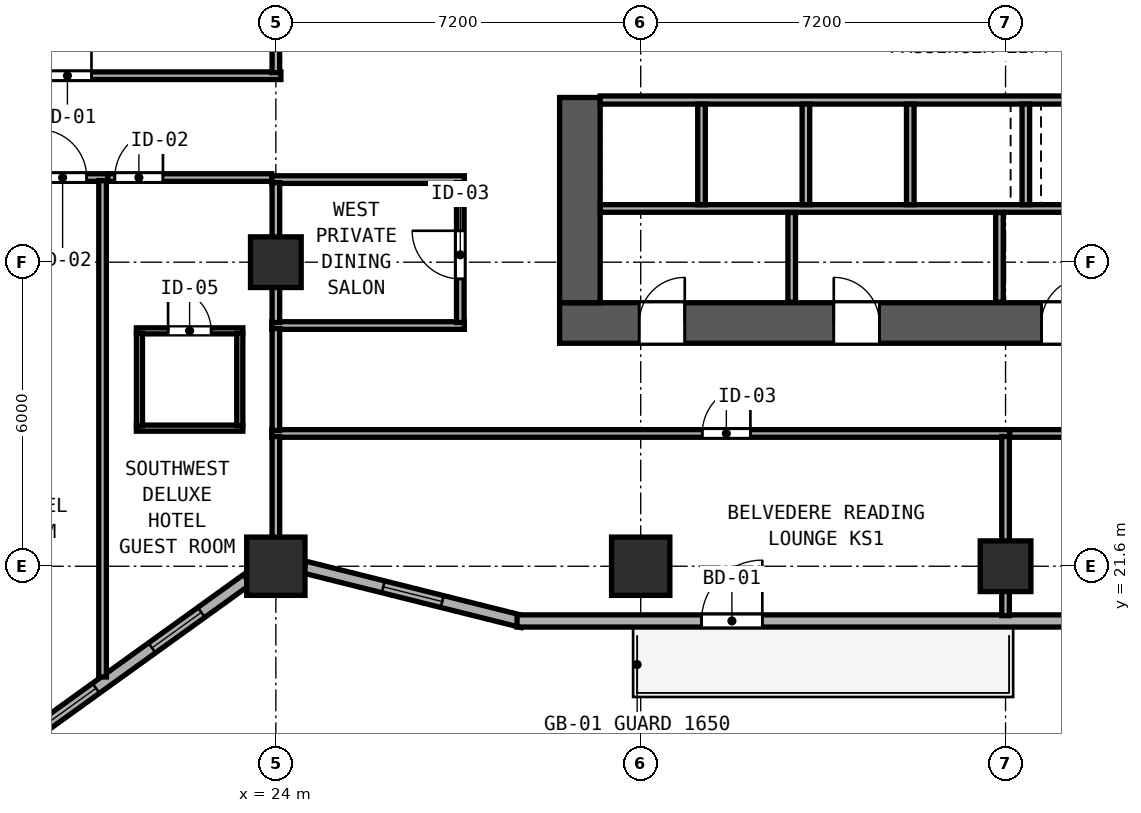
"""IFC4 building model, lengths in metres.
Left out: names, types, materials, properties, quantities, classifications, styles, units other than length and angle.
Written with IfcOpenShell. Run it as: python <this file> out.ifc"""

import sys

from ifc_helpers import new_model, si_unit, direction, frame, frame_2d, origin, origin_2d, place, context, subcontext, project, spatial, rectangle, hollow_rectangle, extrude, element, fill, save


model = new_model("IFC4")
c1 = context("Model", 3, precision=1e-05, world=origin(), true_north=direction((0.0, 1.0)))
c2 = subcontext(c1, "Body", "Model", "MODEL_VIEW")
j1 = project(units=[si_unit("LENGTHUNIT", "METRE"), si_unit("PLANEANGLEUNIT", "RADIAN")], contexts=[c1])
p1 = place(None, origin())
s1 = spatial("IfcSite", under=j1, at=p1, CompositionType="ELEMENT")
p2 = place(p1, origin())
s2 = spatial("IfcBuilding", under=s1, at=p2, CompositionType="ELEMENT")
p3 = place(p2, frame((0.0, 0.0, 55.2)))
s3 = spatial("IfcBuildingStorey", under=s2, at=p3, CompositionType="ELEMENT", Elevation=55.2)
p4 = place(p3, frame((29.6, 26.4, 0.0), z_axis=(0.0, 0.0, 1.0), x_axis=(1.0, 0.0, 0.0)))
e1 = element("IfcWall", 1, at=p4, inside=s3, PredefinedType="SHEAR", context=c2, shape_type="SweptSolid", body=[
    extrude(rectangle(XDim=17.6, YDim=0.8, at=frame_2d((8.8, 0.0))), origin(), (0.0, 0.0, 1.0), 3.6),
])
p5 = place(p4, frame((2.47, 0.0, 0.0), z_axis=(0.0, 0.0, 1.0), x_axis=(-1.0, 0.0, 0.0)))
e2 = element("IfcOpeningElement", 2, at=p5, cuts=e1, PredefinedType="OPENING", context=c2, shape_type="SweptSolid", body=[
    extrude(rectangle(XDim=0.9, YDim=2.1, at=frame_2d((0.45, 1.05))), frame((0.0, 0.41, 0.0), z_axis=(0.0, -1.0, 0.0), x_axis=(1.0, 0.0, 0.0)), (0.0, 0.0, 1.0), 0.82),
])
p6 = place(p4, frame((6.31, 0.0, 0.0), z_axis=(0.0, 0.0, 1.0), x_axis=(-1.0, 0.0, 0.0)))
e3 = element("IfcOpeningElement", 3, at=p6, cuts=e1, PredefinedType="OPENING", context=c2, shape_type="SweptSolid", body=[
    extrude(rectangle(XDim=0.9, YDim=2.1, at=frame_2d((0.45, 1.05))), frame((0.0, 0.41, 0.0), z_axis=(0.0, -1.0, 0.0), x_axis=(1.0, 0.0, 0.0)), (0.0, 0.0, 1.0), 0.82),
])
p7 = place(p4, frame((10.41, 0.0, 0.0), z_axis=(0.0, 0.0, 1.0), x_axis=(-1.0, 0.0, 0.0)))
e4 = element("IfcOpeningElement", 4, at=p7, cuts=e1, PredefinedType="OPENING", context=c2, shape_type="SweptSolid", body=[
    extrude(rectangle(XDim=0.9, YDim=2.1, at=frame_2d((0.45, 1.05))), frame((0.0, 0.41, 0.0), z_axis=(0.0, -1.0, 0.0), x_axis=(1.0, 0.0, 0.0)), (0.0, 0.0, 1.0), 0.82),
])
p8 = place(p4, frame((14.51, 0.0, 0.0), z_axis=(0.0, 0.0, 1.0), x_axis=(-1.0, 0.0, 0.0)))
e5 = element("IfcOpeningElement", 5, at=p8, cuts=e1, PredefinedType="OPENING", context=c2, shape_type="SweptSolid", body=[
    extrude(rectangle(XDim=0.9, YDim=2.1, at=frame_2d((0.45, 1.05))), frame((0.0, 0.41, 0.0), z_axis=(0.0, -1.0, 0.0), x_axis=(1.0, 0.0, 0.0)), (0.0, 0.0, 1.0), 0.82),
])
p9 = place(p3, frame((30.0, 26.8, 0.0), z_axis=(0.0, 0.0, 1.0), x_axis=(0.0, 1.0, 0.0)))
e6 = element("IfcWall", 6, at=p9, inside=s3, PredefinedType="SHEAR", context=c2, shape_type="SweptSolid", body=[
    extrude(rectangle(XDim=4.05, YDim=0.8, at=frame_2d((2.025, 0.0))), origin(), (0.0, 0.0, 1.0), 3.6),
])
for number, where, z_axis, x_axis in (
    (7, (24.0, 21.6, 0.0), (0.0, 0.0, 1.0), (1.0, 0.0, 0.0)),
    (8, (31.2, 21.6, 0.0), (0.0, 0.0, 1.0), (1.0, 0.0, 0.0)),
):
    element("IfcColumn", number, at=place(p3, frame(where, z_axis=z_axis, x_axis=x_axis)), inside=s3, PredefinedType="COLUMN", context=c2, shape_type="SweptSolid", body=[
        extrude(hollow_rectangle(XDim=1.15, YDim=1.15, WallThickness=0.042, at=origin_2d()), origin(), (0.0, 0.0, 1.0), 3.8),
    ])
for number, where, z_axis, x_axis in (
    (9, (24.0, 27.6, 0.0), (0.0, 0.0, 1.0), (1.0, 0.0, 0.0)),
    (10, (38.4, 21.6, 0.0), (0.0, 0.0, 1.0), (1.0, 0.0, 0.0)),
):
    element("IfcColumn", number, at=place(p3, frame(where, z_axis=z_axis, x_axis=x_axis)), inside=s3, PredefinedType="COLUMN", context=c2, shape_type="SweptSolid", body=[
        extrude(hollow_rectangle(XDim=1.0, YDim=1.0, WallThickness=0.038, at=origin_2d()), origin(), (0.0, 0.0, 1.0), 3.8),
    ])
p10 = place(p3, frame((14.075, 14.602, 0.0), z_axis=(0.0, 0.0, 1.0), x_axis=(0.811543176492, 0.58429245476, 0.0)))
e11 = element("IfcWall", 11, at=p10, inside=s3, PredefinedType="SOLIDWALL", context=c2, shape_type="SweptSolid", body=[
    extrude(rectangle(XDim=11.531, YDim=0.24, at=frame_2d((5.765, 0.0))), origin(), (0.0, 0.0, 1.0), 3.097),
])
p11 = place(p10, frame((1.554, 0.0, 0.85)))
e12 = element("IfcOpeningElement", 12, at=p11, cuts=e11, PredefinedType="OPENING", context=c2, shape_type="SweptSolid", body=[
    extrude(rectangle(XDim=1.2, YDim=1.85, at=frame_2d((0.6, 0.925))), frame((0.0, 0.13, 0.0), z_axis=(0.0, -1.0, 0.0), x_axis=(1.0, 0.0, 0.0)), (0.0, 0.0, 1.0), 0.26),
])
p12 = place(p10, frame((6.656, 0.0, 0.85)))
e13 = element("IfcOpeningElement", 13, at=p12, cuts=e11, PredefinedType="OPENING", context=c2, shape_type="SweptSolid", body=[
    extrude(rectangle(XDim=1.2, YDim=1.85, at=frame_2d((0.6, 0.925))), frame((0.0, 0.13, 0.0), z_axis=(0.0, -1.0, 0.0), x_axis=(1.0, 0.0, 0.0)), (0.0, 0.0, 1.0), 0.26),
])
p13 = place(p10, frame((9.218, 0.0, 0.85)))
e14 = element("IfcOpeningElement", 14, at=p13, cuts=e11, PredefinedType="OPENING", context=c2, shape_type="SweptSolid", body=[
    extrude(rectangle(XDim=1.2, YDim=1.85, at=frame_2d((0.6, 0.925))), frame((0.0, 0.13, 0.0), z_axis=(0.0, -1.0, 0.0), x_axis=(1.0, 0.0, 0.0)), (0.0, 0.0, 1.0), 0.26),
])
p14 = place(p3, frame((24.567, 21.582, 0.0), z_axis=(0.0, 0.0, 1.0), x_axis=(0.970148978127, -0.24250971164, 0.0)))
e15 = element("IfcWall", 15, at=p14, inside=s3, PredefinedType="SOLIDWALL", context=c2, shape_type="SweptSolid", body=[
    extrude(rectangle(XDim=4.434, YDim=0.24, at=frame_2d((2.217, 0.0))), origin(), (0.0, 0.0, 1.0), 3.097),
])
p15 = place(p14, frame((1.6, 0.0, 0.85)))
e16 = element("IfcOpeningElement", 16, at=p15, cuts=e15, PredefinedType="OPENING", context=c2, shape_type="SweptSolid", body=[
    extrude(rectangle(XDim=1.2, YDim=1.85, at=frame_2d((0.6, 0.925))), frame((0.0, 0.13, 0.0), z_axis=(0.0, -1.0, 0.0), x_axis=(1.0, 0.0, 0.0)), (0.0, 0.0, 1.0), 0.26),
])
p16 = place(p3, frame((28.76, 20.52, 0.0), z_axis=(0.0, 0.0, 1.0), x_axis=(1.0, 0.0, 0.0)))
e17 = element("IfcWall", 17, at=p16, inside=s3, PredefinedType="SOLIDWALL", context=c2, shape_type="SweptSolid", body=[
    extrude(rectangle(XDim=19.281, YDim=0.24, at=frame_2d((9.64, 0.0))), origin(), (0.0, 0.0, 1.0), 3.6),
])
p17 = place(p16, frame((4.84, 0.0, 0.0), z_axis=(0.0, 0.0, 1.0), x_axis=(-1.0, 0.0, 0.0)))
e18 = element("IfcOpeningElement", 18, at=p17, cuts=e17, PredefinedType="OPENING", context=c2, shape_type="SweptSolid", body=[
    extrude(rectangle(XDim=1.2, YDim=2.15, at=frame_2d((0.6, 1.075))), frame((0.0, 0.13, 0.0), z_axis=(0.0, -1.0, 0.0), x_axis=(1.0, 0.0, 0.0)), (0.0, 0.0, 1.0), 0.26),
])
p18 = place(p3, frame((30.4, 30.8, 0.0), z_axis=(0.0, 0.0, 1.0), x_axis=(1.0, 0.0, 0.0)))
e19 = element("IfcWall", 19, at=p18, inside=s3, PredefinedType="SOLIDWALL", context=c2, shape_type="SweptSolid", body=[
    extrude(rectangle(XDim=16.0, YDim=0.16, at=frame_2d((8.0, 0.0))), origin(), (0.0, 0.0, 1.0), 3.6),
])
p19 = place(p3, frame((30.4, 28.66, 0.0), z_axis=(0.0, 0.0, 1.0), x_axis=(1.0, 0.0, 0.0)))
e20 = element("IfcWall", 20, at=p19, inside=s3, PredefinedType="PARTITIONING", context=c2, shape_type="SweptSolid", body=[
    extrude(rectangle(XDim=16.0, YDim=0.15, at=frame_2d((8.0, 0.0))), origin(), (0.0, 0.0, 1.0), 3.6),
])
for number, where, z_axis, x_axis in (
    (21, (32.4, 28.735, 0.0), (0.0, 0.0, 1.0), (0.0, 1.0, 0.0)),
    (22, (34.46, 28.735, 0.0), (0.0, 0.0, 1.0), (0.0, 1.0, 0.0)),
    (23, (36.52, 28.735, 0.0), (0.0, 0.0, 1.0), (0.0, 1.0, 0.0)),
    (24, (38.8, 28.735, 0.0), (0.0, 0.0, 1.0), (0.0, 1.0, 0.0)),
):
    element("IfcWall", number, at=place(p3, frame(where, z_axis=z_axis, x_axis=x_axis)), inside=s3, PredefinedType="SOLIDWALL", context=c2, shape_type="SweptSolid", body=[
        extrude(rectangle(XDim=1.985, YDim=0.15, at=frame_2d((0.992, 0.0))), origin(), (0.0, 0.0, 1.0), 3.6),
    ])
for number, where, z_axis, x_axis in (
    (25, (34.18, 26.81, 0.0), (0.0, 0.0, 1.0), (0.0, 1.0, 0.0)),
    (26, (38.28, 26.81, 0.0), (0.0, 0.0, 1.0), (0.0, 1.0, 0.0)),
):
    element("IfcWall", number, at=place(p3, frame(where, z_axis=z_axis, x_axis=x_axis)), inside=s3, PredefinedType="PARTITIONING", context=c2, shape_type="SweptSolid", body=[
        extrude(rectangle(XDim=1.77, YDim=0.15, at=frame_2d((0.885, 0.0))), origin(), (0.0, 0.0, 1.0), 3.6),
    ])
for number, where, z_axis, x_axis in (
    (27, (23.92, 29.23, 0.0), (0.0, 0.0, 1.0), (1.0, 0.0, 0.0)),
    (28, (23.92, 26.35, 0.0), (0.0, 0.0, 1.0), (1.0, 0.0, 0.0)),
):
    element("IfcWall", number, at=place(p3, frame(where, z_axis=z_axis, x_axis=x_axis)), inside=s3, PredefinedType="PARTITIONING", context=c2, shape_type="SweptSolid", body=[
        extrude(rectangle(XDim=3.8, YDim=0.15, at=frame_2d((1.9, 0.0))), origin(), (0.0, 0.0, 1.0), 3.6),
    ])
p20 = place(p3, frame((24.0, 26.41, 0.0), z_axis=(0.0, 0.0, 1.0), x_axis=(0.0, 1.0, 0.0)))
e29 = element("IfcWall", 29, at=p20, inside=s3, PredefinedType="PARTITIONING", context=c2, shape_type="SweptSolid", body=[
    extrude(rectangle(XDim=2.76, YDim=0.15, at=frame_2d((1.38, 0.0))), origin(), (0.0, 0.0, 1.0), 3.097),
])
p21 = place(p3, frame((27.64, 26.41, 0.0), z_axis=(0.0, 0.0, 1.0), x_axis=(0.0, 1.0, 0.0)))
e30 = element("IfcWall", 30, at=p21, inside=s3, PredefinedType="PARTITIONING", context=c2, shape_type="SweptSolid", body=[
    extrude(rectangle(XDim=2.76, YDim=0.15, at=frame_2d((1.38, 0.0))), origin(), (0.0, 0.0, 1.0), 3.6),
])
p22 = place(p21, frame((1.81, 0.0, 0.0), z_axis=(0.0, 0.0, 1.0), x_axis=(-1.0, 0.0, 0.0)))
e31 = element("IfcOpeningElement", 31, at=p22, cuts=e30, PredefinedType="OPENING", context=c2, shape_type="SweptSolid", body=[
    extrude(rectangle(XDim=0.95, YDim=2.12, at=frame_2d((0.475, 1.06))), frame((0.0, 0.085, 0.0), z_axis=(0.0, -1.0, 0.0), x_axis=(1.0, 0.0, 0.0)), (0.0, 0.0, 1.0), 0.17),
])
p23 = place(p3, frame((23.92, 24.22, 0.0), z_axis=(0.0, 0.0, 1.0), x_axis=(1.0, 0.0, 0.0)))
e32 = element("IfcWall", 32, at=p23, inside=s3, PredefinedType="PARTITIONING", context=c2, shape_type="SweptSolid", body=[
    extrude(rectangle(XDim=14.56, YDim=0.15, at=frame_2d((7.28, 0.0))), origin(), (0.0, 0.0, 1.0), 3.6),
])
p24 = place(p23, frame((9.445, 0.0, 0.0), z_axis=(0.0, 0.0, 1.0), x_axis=(-1.0, 0.0, 0.0)))
e33 = element("IfcOpeningElement", 33, at=p24, cuts=e32, PredefinedType="OPENING", context=c2, shape_type="SweptSolid", body=[
    extrude(rectangle(XDim=0.95, YDim=2.12, at=frame_2d((0.475, 1.06))), frame((0.0, 0.085, 0.0), z_axis=(0.0, -1.0, 0.0), x_axis=(1.0, 0.0, 0.0)), (0.0, 0.0, 1.0), 0.17),
])
p25 = place(p3, frame((24.0, 21.819, 0.0), z_axis=(0.0, 0.0, 1.0), x_axis=(0.0, 1.0, 0.0)))
e34 = element("IfcWall", 34, at=p25, inside=s3, PredefinedType="PARTITIONING", context=c2, shape_type="SweptSolid", body=[
    extrude(rectangle(XDim=2.341, YDim=0.15, at=frame_2d((1.171, 0.0))), origin(), (0.0, 0.0, 1.0), 3.097),
])
p26 = place(p3, frame((38.4, 20.625, 0.0), z_axis=(0.0, 0.0, 1.0), x_axis=(0.0, 1.0, 0.0)))
e35 = element("IfcWall", 35, at=p26, inside=s3, PredefinedType="PARTITIONING", context=c2, shape_type="SweptSolid", body=[
    extrude(rectangle(XDim=3.535, YDim=0.15, at=frame_2d((1.768, 0.0))), origin(), (0.0, 0.0, 1.0), 2.985),
])
p27 = place(p3, frame((38.482, 24.22, 0.0), z_axis=(0.0, 0.0, 1.0), x_axis=(1.0, 0.0, 0.0)))
e36 = element("IfcWall", 36, at=p27, inside=s3, PredefinedType="PARTITIONING", context=c2, shape_type="SweptSolid", body=[
    extrude(rectangle(XDim=7.198, YDim=0.15, at=frame_2d((3.599, 0.0))), origin(), (0.0, 0.0, 1.0), 3.6),
])
p28 = place(p27, frame((3.913, 0.0, 0.0), z_axis=(0.0, 0.0, 1.0), x_axis=(-1.0, 0.0, 0.0)))
e37 = element("IfcOpeningElement", 37, at=p28, cuts=e36, PredefinedType="OPENING", context=c2, shape_type="SweptSolid", body=[
    extrude(rectangle(XDim=0.95, YDim=2.12, at=frame_2d((0.475, 1.06))), frame((0.0, 0.085, 0.0), z_axis=(0.0, -1.0, 0.0), x_axis=(1.0, 0.0, 0.0)), (0.0, 0.0, 1.0), 0.17),
])
p29 = place(p3, frame((16.542, 31.28, 0.0), z_axis=(0.0, 0.0, 1.0), x_axis=(1.0, 0.0, 0.0)))
e38 = element("IfcWall", 38, at=p29, inside=s3, PredefinedType="PARTITIONING", context=c2, shape_type="SweptSolid", body=[
    extrude(rectangle(XDim=7.558, YDim=0.15, at=frame_2d((3.779, 0.0))), origin(), (0.0, 0.0, 1.0), 3.6),
])
p30 = place(p29, frame((2.869, 0.0, 0.0)))
e39 = element("IfcOpeningElement", 39, at=p30, cuts=e38, PredefinedType="OPENING", context=c2, shape_type="SweptSolid", body=[
    extrude(rectangle(XDim=0.95, YDim=2.18, at=frame_2d((0.475, 1.09))), frame((0.0, 0.085, 0.0), z_axis=(0.0, -1.0, 0.0), x_axis=(1.0, 0.0, 0.0)), (0.0, 0.0, 1.0), 0.17),
])
p31 = place(p3, frame((24.0, 31.34, 0.0), z_axis=(0.0, 0.0, 1.0), x_axis=(0.0, 1.0, 0.0)))
e40 = element("IfcWall", 40, at=p31, inside=s3, PredefinedType="PARTITIONING", context=c2, shape_type="SweptSolid", body=[
    extrude(rectangle(XDim=1.6, YDim=0.15, at=frame_2d((0.8, 0.0))), origin(), (0.0, 0.0, 1.0), 3.097),
])
p32 = place(p3, frame((16.542, 29.27, 0.0), z_axis=(0.0, 0.0, 1.0), x_axis=(1.0, 0.0, 0.0)))
e41 = element("IfcWall", 41, at=p32, inside=s3, PredefinedType="PARTITIONING", context=c2, shape_type="SweptSolid", body=[
    extrude(rectangle(XDim=4.138, YDim=0.15, at=frame_2d((2.069, 0.0))), origin(), (0.0, 0.0, 1.0), 3.6),
])
p33 = place(p32, frame((3.725, 0.0, 0.0), z_axis=(0.0, 0.0, 1.0), x_axis=(-1.0, 0.0, 0.0)))
e42 = element("IfcOpeningElement", 42, at=p33, cuts=e41, PredefinedType="OPENING", context=c2, shape_type="SweptSolid", body=[
    extrude(rectangle(XDim=0.95, YDim=2.15, at=frame_2d((0.475, 1.075))), frame((0.0, 0.085, 0.0), z_axis=(0.0, -1.0, 0.0), x_axis=(1.0, 0.0, 0.0)), (0.0, 0.0, 1.0), 0.17),
])
p34 = place(p3, frame((20.58, 19.415, 0.0), z_axis=(0.0, 0.0, 1.0), x_axis=(0.0, 1.0, 0.0)))
e43 = element("IfcWall", 43, at=p34, inside=s3, PredefinedType="PARTITIONING", context=c2, shape_type="SweptSolid", body=[
    extrude(rectangle(XDim=9.795, YDim=0.15, at=frame_2d((4.897, 0.0))), origin(), (0.0, 0.0, 1.0), 3.6),
])
p35 = place(p3, frame((20.682, 29.27, 0.0), z_axis=(0.0, 0.0, 1.0), x_axis=(1.0, 0.0, 0.0)))
e44 = element("IfcWall", 44, at=p35, inside=s3, PredefinedType="PARTITIONING", context=c2, shape_type="SweptSolid", body=[
    extrude(rectangle(XDim=3.236, YDim=0.15, at=frame_2d((1.618, 0.0))), origin(), (0.0, 0.0, 1.0), 3.6),
])
p36 = place(p35, frame((1.09, 0.0, 0.0), z_axis=(0.0, 0.0, 1.0), x_axis=(-1.0, 0.0, 0.0)))
e45 = element("IfcOpeningElement", 45, at=p36, cuts=e44, PredefinedType="OPENING", context=c2, shape_type="SweptSolid", body=[
    extrude(rectangle(XDim=0.95, YDim=2.15, at=frame_2d((0.475, 1.075))), frame((0.0, 0.085, 0.0), z_axis=(0.0, -1.0, 0.0), x_axis=(1.0, 0.0, 0.0)), (0.0, 0.0, 1.0), 0.17),
])
p37 = place(p3, frame((24.0, 24.28, 0.0), z_axis=(0.0, 0.0, 1.0), x_axis=(0.0, 1.0, 0.0)))
e46 = element("IfcWall", 46, at=p37, inside=s3, PredefinedType="PARTITIONING", context=c2, shape_type="SweptSolid", body=[
    extrude(rectangle(XDim=2.01, YDim=0.15, at=frame_2d((1.005, 0.0))), origin(), (0.0, 0.0, 1.0), 3.097),
])
p38 = place(p3, frame((21.248, 26.245, 0.0), z_axis=(0.0, 0.0, 1.0), x_axis=(1.0, 0.0, 0.0)))
e47 = element("IfcWall", 47, at=p38, inside=s3, PredefinedType="PARTITIONING", context=c2, shape_type="SweptSolid", body=[
    extrude(rectangle(XDim=2.1, YDim=0.12, at=frame_2d((1.05, 0.0))), origin(), (0.0, 0.0, 1.0), 3.6),
])
p39 = place(p38, frame((1.475, 0.0, 0.0), z_axis=(0.0, 0.0, 1.0), x_axis=(-1.0, 0.0, 0.0)))
e48 = element("IfcOpeningElement", 48, at=p39, cuts=e47, PredefinedType="OPENING", context=c2, shape_type="SweptSolid", body=[
    extrude(rectangle(XDim=0.85, YDim=2.1, at=frame_2d((0.425, 1.05))), frame((0.0, 0.07, 0.0), z_axis=(0.0, -1.0, 0.0), x_axis=(1.0, 0.0, 0.0)), (0.0, 0.0, 1.0), 0.14),
])
p40 = place(p3, frame((21.248, 24.325, 0.0), z_axis=(0.0, 0.0, 1.0), x_axis=(1.0, 0.0, 0.0)))
e49 = element("IfcWall", 49, at=p40, inside=s3, PredefinedType="PARTITIONING", context=c2, shape_type="SweptSolid", body=[
    extrude(rectangle(XDim=2.1, YDim=0.12, at=frame_2d((1.05, 0.0))), origin(), (0.0, 0.0, 1.0), 3.6),
])
for number, where, z_axis, x_axis in (
    (50, (21.308, 24.37, 0.0), (0.0, 0.0, 1.0), (0.0, 1.0, 0.0)),
    (51, (23.288, 24.37, 0.0), (0.0, 0.0, 1.0), (0.0, 1.0, 0.0)),
):
    element("IfcWall", number, at=place(p3, frame(where, z_axis=z_axis, x_axis=x_axis)), inside=s3, PredefinedType="PARTITIONING", context=c2, shape_type="SweptSolid", body=[
        extrude(rectangle(XDim=1.83, YDim=0.12, at=frame_2d((0.915, 0.0))), origin(), (0.0, 0.0, 1.0), 3.6),
    ])
p41 = place(p12, origin())
e52 = element("IfcWindow", 52, at=p41, inside=s3, PartitioningType="SINGLE_PANEL", PredefinedType="WINDOW", context=c2, shape_type="SweptSolid", body=[
    extrude(rectangle(XDim=1.2, YDim=1.85, at=frame_2d((0.6, 0.925))), frame((0.0, 0.03, 0.0), z_axis=(0.0, -1.0, 0.0), x_axis=(1.0, 0.0, 0.0)), (0.0, 0.0, 1.0), 0.06),
])
fill(e13, e52)
p42 = place(p15, origin())
e53 = element("IfcWindow", 53, at=p42, inside=s3, PartitioningType="SINGLE_PANEL", PredefinedType="WINDOW", context=c2, shape_type="SweptSolid", body=[
    extrude(rectangle(XDim=1.2, YDim=1.85, at=frame_2d((0.6, 0.925))), frame((0.0, 0.03, 0.0), z_axis=(0.0, -1.0, 0.0), x_axis=(1.0, 0.0, 0.0)), (0.0, 0.0, 1.0), 0.06),
])
fill(e16, e53)
p43 = place(p17, origin())
e54 = element("IfcDoor", 54, at=p43, inside=s3, OperationType="SINGLE_SWING_LEFT", PredefinedType="DOOR", context=c2, shape_type="SweptSolid", body=[
    extrude(rectangle(XDim=1.2, YDim=2.15, at=frame_2d((0.6, 1.075))), frame((0.0, 0.025, 0.0), z_axis=(0.0, -1.0, 0.0), x_axis=(1.0, 0.0, 0.0)), (0.0, 0.0, 1.0), 0.05),
])
fill(e18, e54)
p44 = place(p5, origin())
e55 = element("IfcDoor", 55, at=p44, inside=s3, OperationType="SINGLE_SWING_LEFT", PredefinedType="DOOR", context=c2, shape_type="SweptSolid", body=[
    extrude(rectangle(XDim=0.9, YDim=2.1, at=frame_2d((0.45, 1.05))), frame((0.0, -0.195, 0.0), z_axis=(0.0, -1.0, 0.0), x_axis=(1.0, 0.0, 0.0)), (0.0, 0.0, 1.0), 0.05),
])
fill(e2, e55)
p45 = place(p6, origin())
e56 = element("IfcDoor", 56, at=p45, inside=s3, OperationType="SINGLE_SWING_RIGHT", PredefinedType="DOOR", context=c2, shape_type="SweptSolid", body=[
    extrude(rectangle(XDim=0.9, YDim=2.1, at=frame_2d((0.45, 1.05))), frame((0.0, -0.195, 0.0), z_axis=(0.0, -1.0, 0.0), x_axis=(1.0, 0.0, 0.0)), (0.0, 0.0, 1.0), 0.05),
])
fill(e3, e56)
p46 = place(p7, origin())
e57 = element("IfcDoor", 57, at=p46, inside=s3, OperationType="SINGLE_SWING_LEFT", PredefinedType="DOOR", context=c2, shape_type="SweptSolid", body=[
    extrude(rectangle(XDim=0.9, YDim=2.1, at=frame_2d((0.45, 1.05))), frame((0.0, -0.195, 0.0), z_axis=(0.0, -1.0, 0.0), x_axis=(1.0, 0.0, 0.0)), (0.0, 0.0, 1.0), 0.05),
])
fill(e4, e57)
p47 = place(p22, origin())
e58 = element("IfcDoor", 58, at=p47, inside=s3, OperationType="SINGLE_SWING_LEFT", PredefinedType="DOOR", context=c2, shape_type="SweptSolid", body=[
    extrude(rectangle(XDim=0.95, YDim=2.12, at=frame_2d((0.475, 1.06))), frame((0.0, 0.025, 0.0), z_axis=(0.0, -1.0, 0.0), x_axis=(1.0, 0.0, 0.0)), (0.0, 0.0, 1.0), 0.05),
])
fill(e31, e58)
p48 = place(p24, origin())
e59 = element("IfcDoor", 59, at=p48, inside=s3, OperationType="SINGLE_SWING_LEFT", PredefinedType="DOOR", context=c2, shape_type="SweptSolid", body=[
    extrude(rectangle(XDim=0.95, YDim=2.12, at=frame_2d((0.475, 1.06))), frame((0.0, 0.025, 0.0), z_axis=(0.0, -1.0, 0.0), x_axis=(1.0, 0.0, 0.0)), (0.0, 0.0, 1.0), 0.05),
])
fill(e33, e59)
p49 = place(p30, origin())
e60 = element("IfcDoor", 60, at=p49, inside=s3, OperationType="SINGLE_SWING_RIGHT", PredefinedType="DOOR", context=c2, shape_type="SweptSolid", body=[
    extrude(rectangle(XDim=0.95, YDim=2.18, at=frame_2d((0.475, 1.09))), frame((0.0, 0.025, 0.0), z_axis=(0.0, -1.0, 0.0), x_axis=(1.0, 0.0, 0.0)), (0.0, 0.0, 1.0), 0.05),
])
fill(e39, e60)
p50 = place(p33, origin())
e61 = element("IfcDoor", 61, at=p50, inside=s3, OperationType="SINGLE_SWING_RIGHT", PredefinedType="DOOR", context=c2, shape_type="SweptSolid", body=[
    extrude(rectangle(XDim=0.95, YDim=2.15, at=frame_2d((0.475, 1.075))), frame((0.0, 0.025, 0.0), z_axis=(0.0, -1.0, 0.0), x_axis=(1.0, 0.0, 0.0)), (0.0, 0.0, 1.0), 0.05),
])
fill(e42, e61)
p51 = place(p36, origin())
e62 = element("IfcDoor", 62, at=p51, inside=s3, OperationType="SINGLE_SWING_LEFT", PredefinedType="DOOR", context=c2, shape_type="SweptSolid", body=[
    extrude(rectangle(XDim=0.95, YDim=2.15, at=frame_2d((0.475, 1.075))), frame((0.0, 0.025, 0.0), z_axis=(0.0, -1.0, 0.0), x_axis=(1.0, 0.0, 0.0)), (0.0, 0.0, 1.0), 0.05),
])
fill(e45, e62)
p52 = place(p39, origin())
e63 = element("IfcDoor", 63, at=p52, inside=s3, OperationType="SINGLE_SWING_RIGHT", PredefinedType="DOOR", context=c2, shape_type="SweptSolid", body=[
    extrude(rectangle(XDim=0.85, YDim=2.1, at=frame_2d((0.425, 1.05))), frame((0.0, 0.025, 0.0), z_axis=(0.0, -1.0, 0.0), x_axis=(1.0, 0.0, 0.0)), (0.0, 0.0, 1.0), 0.05),
])
fill(e48, e63)
p53 = place(p13, origin())
e64 = element("IfcWindow", 64, at=p53, inside=s3, PartitioningType="SINGLE_PANEL", PredefinedType="WINDOW", context=c2, shape_type="SweptSolid", body=[
    extrude(rectangle(XDim=1.2, YDim=1.85, at=frame_2d((0.6, 0.925))), frame((0.0, 0.03, 0.0), z_axis=(0.0, -1.0, 0.0), x_axis=(1.0, 0.0, 0.0)), (0.0, 0.0, 1.0), 0.06),
])
fill(e14, e64)
save(model, sys.argv[1])
